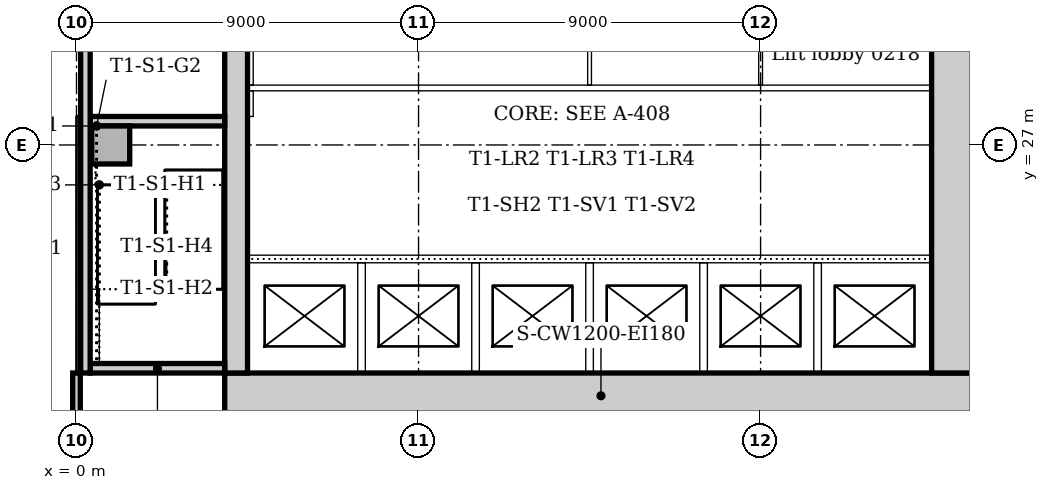
"""IFC4 building model, lengths in metres.
Left out: names, types, materials, properties, quantities, classifications, styles, units other than length and angle.
Written with IfcOpenShell. Run it as: python <this file> out.ifc"""

import sys

from ifc_helpers import new_model, si_unit, direction, frame, frame_2d, origin, origin_2d, place, context, subcontext, project, spatial, rectangle, extrude, element, fill, save


model = new_model("IFC4")
c1 = context("Model", 3, precision=1e-05, world=origin(), true_north=direction((0.0, 1.0)))
c2 = subcontext(c1, "Body", "Model", "MODEL_VIEW")
j1 = project(units=[si_unit("LENGTHUNIT", "METRE"), si_unit("PLANEANGLEUNIT", "RADIAN")], contexts=[c1])
p1 = place(None, origin())
s1 = spatial("IfcSite", under=j1, at=p1, CompositionType="ELEMENT")
p2 = place(p1, origin())
s2 = spatial("IfcBuilding", under=s1, at=p2, CompositionType="ELEMENT")
p3 = place(p2, frame((0.0, 0.0, 11.0)))
s3 = spatial("IfcBuildingStorey", under=s2, at=p3, CompositionType="ELEMENT", Elevation=11.0)
p4 = place(p3, frame((3.9, 20.4, 0.0), z_axis=(0.0, 0.0, 1.0), x_axis=(1.0, 0.0, 0.0)))
e1 = element("IfcWall", 1, at=p4, inside=s3, PredefinedType="SOLIDWALL", context=c2, shape_type="SweptSolid", body=[
    extrude(rectangle(XDim=19.8, YDim=1.2, at=frame_2d((9.9, 0.0))), origin(), (0.0, 0.0, 1.0), 5.0),
])
p5 = place(p3, frame((23.1, 21.0, 0.0), z_axis=(0.0, 0.0, 1.0), x_axis=(0.0, 1.0, 0.0)))
e2 = element("IfcWall", 2, at=p5, inside=s3, PredefinedType="SOLIDWALL", context=c2, shape_type="SweptSolid", body=[
    extrude(rectangle(XDim=10.5, YDim=1.2, at=frame_2d((5.25, 0.0))), origin(), (0.0, 0.0, 1.0), 5.0),
])
p6 = place(p5, frame((4.35, 0.0, 0.0)))
e3 = element("IfcOpeningElement", 3, at=p6, cuts=e2, PredefinedType="OPENING", context=c2, shape_type="SweptSolid", body=[
    extrude(rectangle(XDim=1.8, YDim=2.1, at=frame_2d((0.9, 1.05))), frame((0.0, 0.61, 0.0), z_axis=(0.0, -1.0, 0.0), x_axis=(1.0, 0.0, 0.0)), (0.0, 0.0, 1.0), 1.22),
])
p7 = place(p3, frame((4.2, 31.5, 0.0), z_axis=(0.0, 0.0, 1.0), x_axis=(0.0, -1.0, 0.0)))
e4 = element("IfcWall", 4, at=p7, inside=s3, PredefinedType="SOLIDWALL", context=c2, shape_type="SweptSolid", body=[
    extrude(rectangle(XDim=10.5, YDim=0.6, at=frame_2d((5.25, 0.0))), origin(), (0.0, 0.0, 1.0), 5.0),
])
p8 = place(p7, frame((4.25, 0.0, 0.0)))
e5 = element("IfcOpeningElement", 5, at=p8, cuts=e4, PredefinedType="OPENING", context=c2, shape_type="SweptSolid", body=[
    extrude(rectangle(XDim=1.0, YDim=2.1, at=frame_2d((0.5, 1.05))), frame((0.0, 0.31, 0.0), z_axis=(0.0, -1.0, 0.0), x_axis=(1.0, 0.0, 0.0)), (0.0, 0.0, 1.0), 0.62),
])
p9 = place(p3, frame((0.36, 21.125, 0.0), z_axis=(0.0, 0.0, 1.0), x_axis=(1.0, 0.0, 0.0)))
e6 = element("IfcWall", 6, at=p9, inside=s3, PredefinedType="SOLIDWALL", context=c2, shape_type="SweptSolid", body=[
    extrude(rectangle(XDim=3.54, YDim=0.25, at=frame_2d((1.77, 0.0))), origin(), (0.0, 0.0, 1.0), 5.0),
])
p10 = place(p3, frame((3.9, 27.625, 0.0), z_axis=(0.0, 0.0, 1.0), x_axis=(-1.0, 0.0, 0.0)))
e7 = element("IfcWall", 7, at=p10, inside=s3, PredefinedType="SOLIDWALL", context=c2, shape_type="SweptSolid", body=[
    extrude(rectangle(XDim=3.54, YDim=0.25, at=frame_2d((1.77, 0.0))), origin(), (0.0, 0.0, 1.0), 5.0),
])
p11 = place(p10, frame((0.4, 0.0, 0.0)))
e8 = element("IfcOpeningElement", 8, at=p11, cuts=e7, PredefinedType="OPENING", context=c2, shape_type="SweptSolid", body=[
    extrude(rectangle(XDim=1.0, YDim=2.1, at=frame_2d((0.5, 1.05))), frame((0.0, 0.135, 0.0), z_axis=(0.0, -1.0, 0.0), x_axis=(1.0, 0.0, 0.0)), (0.0, 0.0, 1.0), 0.27),
])
p12 = place(p3, frame((0.235, 21.0, 0.0), z_axis=(0.0, 0.0, 1.0), x_axis=(0.0, 1.0, 0.0)))
e9 = element("IfcWall", 9, at=p12, inside=s3, PredefinedType="SOLIDWALL", context=c2, shape_type="SweptSolid", body=[
    extrude(rectangle(XDim=21.0, YDim=0.25, at=frame_2d((10.5, 0.0))), origin(), (0.0, 0.0, 1.0), 5.0),
])
p13 = place(p3, frame((0.9, 27.0, 0.0), z_axis=(0.0, 0.0, 1.0), x_axis=(1.0, 0.0, 0.0)))
e10 = element("IfcColumn", 10, at=p13, inside=s3, PredefinedType="COLUMN", context=c2, shape_type="SweptSolid", body=[
    extrude(rectangle(XDim=1.0, YDim=1.0, at=origin_2d()), origin(), (0.0, 0.0, 1.0), 5.0),
])
p14 = place(p3, frame((0.0, 3.7, 0.0), z_axis=(0.0, 0.0, 1.0), x_axis=(0.0, 1.0, 0.0)))
e11 = element("IfcWall", 11, at=p14, inside=s3, PredefinedType="PARTITIONING", context=c2, shape_type="SweptSolid", body=[
    extrude(rectangle(XDim=17.3, YDim=0.2, at=frame_2d((8.65, 0.0))), origin(), (0.0, 0.0, 1.0), 4.7),
])
p15 = place(p14, frame((7.7, 0.0, 0.0)))
e12 = element("IfcOpeningElement", 12, at=p15, cuts=e11, PredefinedType="OPENING", context=c2, shape_type="SweptSolid", body=[
    extrude(rectangle(XDim=1.8, YDim=2.1, at=frame_2d((0.9, 1.05))), frame((0.0, 0.11, 0.0), z_axis=(0.0, -1.0, 0.0), x_axis=(1.0, 0.0, 0.0)), (0.0, 0.0, 1.0), 0.22),
])
p16 = place(p3, frame((0.48, 21.25, 0.0), z_axis=(0.0, 0.0, 1.0), x_axis=(0.0, 1.0, 0.0)))
e13 = element("IfcWall", 13, at=p16, inside=s3, PredefinedType="STANDARD", context=c2, shape_type="SweptSolid", body=[
    extrude(rectangle(XDim=1.955, YDim=0.24, at=frame_2d((0.978, 0.0))), origin(), (0.0, 0.0, 1.0), 5.0),
])
p17 = place(p3, frame((4.5, 24.0, 0.0), z_axis=(0.0, 0.0, 1.0), x_axis=(1.0, 0.0, 0.0)))
e14 = element("IfcWall", 14, at=p17, inside=s3, PredefinedType="PARTITIONING", context=c2, shape_type="SweptSolid", body=[
    extrude(rectangle(XDim=18.0, YDim=0.2, at=frame_2d((9.0, 0.0))), origin(), (0.0, 0.0, 1.0), 4.7),
])
p18 = place(p17, frame((0.95, 0.0, 0.0)))
e15 = element("IfcOpeningElement", 15, at=p18, cuts=e14, PredefinedType="OPENING", context=c2, shape_type="SweptSolid", body=[
    extrude(rectangle(XDim=1.1, YDim=2.1, at=frame_2d((0.55, 1.05))), frame((0.0, 0.11, 0.0), z_axis=(0.0, -1.0, 0.0), x_axis=(1.0, 0.0, 0.0)), (0.0, 0.0, 1.0), 0.22),
])
p19 = place(p17, frame((3.95, 0.0, 0.0)))
e16 = element("IfcOpeningElement", 16, at=p19, cuts=e14, PredefinedType="OPENING", context=c2, shape_type="SweptSolid", body=[
    extrude(rectangle(XDim=1.1, YDim=2.1, at=frame_2d((0.55, 1.05))), frame((0.0, 0.11, 0.0), z_axis=(0.0, -1.0, 0.0), x_axis=(1.0, 0.0, 0.0)), (0.0, 0.0, 1.0), 0.22),
])
p20 = place(p17, frame((6.95, 0.0, 0.0)))
e17 = element("IfcOpeningElement", 17, at=p20, cuts=e14, PredefinedType="OPENING", context=c2, shape_type="SweptSolid", body=[
    extrude(rectangle(XDim=1.1, YDim=2.1, at=frame_2d((0.55, 1.05))), frame((0.0, 0.11, 0.0), z_axis=(0.0, -1.0, 0.0), x_axis=(1.0, 0.0, 0.0)), (0.0, 0.0, 1.0), 0.22),
])
p21 = place(p17, frame((9.95, 0.0, 0.0)))
e18 = element("IfcOpeningElement", 18, at=p21, cuts=e14, PredefinedType="OPENING", context=c2, shape_type="SweptSolid", body=[
    extrude(rectangle(XDim=1.1, YDim=2.1, at=frame_2d((0.55, 1.05))), frame((0.0, 0.11, 0.0), z_axis=(0.0, -1.0, 0.0), x_axis=(1.0, 0.0, 0.0)), (0.0, 0.0, 1.0), 0.22),
])
p22 = place(p17, frame((12.95, 0.0, 0.0)))
e19 = element("IfcOpeningElement", 19, at=p22, cuts=e14, PredefinedType="OPENING", context=c2, shape_type="SweptSolid", body=[
    extrude(rectangle(XDim=1.1, YDim=2.1, at=frame_2d((0.55, 1.05))), frame((0.0, 0.11, 0.0), z_axis=(0.0, -1.0, 0.0), x_axis=(1.0, 0.0, 0.0)), (0.0, 0.0, 1.0), 0.22),
])
p23 = place(p17, frame((15.95, 0.0, 0.0)))
e20 = element("IfcOpeningElement", 20, at=p23, cuts=e14, PredefinedType="OPENING", context=c2, shape_type="SweptSolid", body=[
    extrude(rectangle(XDim=1.1, YDim=2.1, at=frame_2d((0.55, 1.05))), frame((0.0, 0.11, 0.0), z_axis=(0.0, -1.0, 0.0), x_axis=(1.0, 0.0, 0.0)), (0.0, 0.0, 1.0), 0.22),
])
for number, where, z_axis, x_axis in (
    (21, (7.5, 21.0, 0.0), (0.0, 0.0, 1.0), (0.0, 1.0, 0.0)),
    (22, (10.5, 21.0, 0.0), (0.0, 0.0, 1.0), (0.0, 1.0, 0.0)),
    (23, (13.5, 21.0, 0.0), (0.0, 0.0, 1.0), (0.0, 1.0, 0.0)),
    (24, (16.5, 21.0, 0.0), (0.0, 0.0, 1.0), (0.0, 1.0, 0.0)),
    (25, (19.5, 21.0, 0.0), (0.0, 0.0, 1.0), (0.0, 1.0, 0.0)),
):
    element("IfcWall", number, at=place(p3, frame(where, z_axis=z_axis, x_axis=x_axis)), inside=s3, PredefinedType="PARTITIONING", context=c2, shape_type="SweptSolid", body=[
        extrude(rectangle(XDim=2.9, YDim=0.2, at=frame_2d((1.45, 0.0))), origin(), (0.0, 0.0, 1.0), 4.7),
    ])
p24 = place(p3, frame((4.5, 28.5, 0.0), z_axis=(0.0, 0.0, 1.0), x_axis=(1.0, 0.0, 0.0)))
e26 = element("IfcWall", 26, at=p24, inside=s3, PredefinedType="PARTITIONING", context=c2, shape_type="SweptSolid", body=[
    extrude(rectangle(XDim=18.0, YDim=0.15, at=frame_2d((9.0, 0.0))), origin(), (0.0, 0.0, 1.0), 4.7),
])
p25 = place(p24, frame((4.1, 0.0, 0.0)))
e27 = element("IfcOpeningElement", 27, at=p25, cuts=e26, PredefinedType="OPENING", context=c2, shape_type="SweptSolid", body=[
    extrude(rectangle(XDim=0.9, YDim=2.1, at=frame_2d((0.45, 1.05))), frame((0.0, 0.085, 0.0), z_axis=(0.0, -1.0, 0.0), x_axis=(1.0, 0.0, 0.0)), (0.0, 0.0, 1.0), 0.17),
])
p26 = place(p24, frame((10.8, 0.0, 0.0)))
e28 = element("IfcOpeningElement", 28, at=p26, cuts=e26, PredefinedType="OPENING", context=c2, shape_type="SweptSolid", body=[
    extrude(rectangle(XDim=0.9, YDim=2.1, at=frame_2d((0.45, 1.05))), frame((0.0, 0.085, 0.0), z_axis=(0.0, -1.0, 0.0), x_axis=(1.0, 0.0, 0.0)), (0.0, 0.0, 1.0), 0.17),
])
p27 = place(p24, frame((15.2, 0.0, 0.0)))
e29 = element("IfcOpeningElement", 29, at=p27, cuts=e26, PredefinedType="OPENING", context=c2, shape_type="SweptSolid", body=[
    extrude(rectangle(XDim=0.9, YDim=2.1, at=frame_2d((0.45, 1.05))), frame((0.0, 0.085, 0.0), z_axis=(0.0, -1.0, 0.0), x_axis=(1.0, 0.0, 0.0)), (0.0, 0.0, 1.0), 0.17),
])
p28 = place(p3, frame((4.575, 27.75, 0.0), z_axis=(0.0, 0.0, 1.0), x_axis=(0.0, 1.0, 0.0)))
e30 = element("IfcWall", 30, at=p28, inside=s3, PredefinedType="PARTITIONING", context=c2, shape_type="SweptSolid", body=[
    extrude(rectangle(XDim=0.675, YDim=0.15, at=frame_2d((0.338, 0.0))), origin(), (0.0, 0.0, 1.0), 4.7),
])
p29 = place(p3, frame((4.575, 28.575, 0.0), z_axis=(0.0, 0.0, 1.0), x_axis=(0.0, 1.0, 0.0)))
e31 = element("IfcWall", 31, at=p29, inside=s3, PredefinedType="PARTITIONING", context=c2, shape_type="SweptSolid", body=[
    extrude(rectangle(XDim=2.675, YDim=0.15, at=frame_2d((1.337, 0.0))), origin(), (0.0, 0.0, 1.0), 4.7),
])
for number, where, z_axis, x_axis in (
    (32, (13.5, 28.575, 0.0), (0.0, 0.0, 1.0), (0.0, 1.0, 0.0)),
    (33, (18.0, 28.575, 0.0), (0.0, 0.0, 1.0), (0.0, 1.0, 0.0)),
):
    element("IfcWall", number, at=place(p3, frame(where, z_axis=z_axis, x_axis=x_axis)), inside=s3, PredefinedType="PARTITIONING", context=c2, shape_type="SweptSolid", body=[
        extrude(rectangle(XDim=2.675, YDim=0.1, at=frame_2d((1.337, 0.0))), origin(), (0.0, 0.0, 1.0), 4.7),
    ])
p30 = place(p8, frame((1.0, 0.0, 0.0), z_axis=(0.0, 0.0, 1.0), x_axis=(-1.0, 0.0, 0.0)))
e34 = element("IfcDoor", 34, at=p30, inside=s3, OperationType="SINGLE_SWING_RIGHT", PredefinedType="DOOR", context=c2, shape_type="SweptSolid", body=[
    extrude(rectangle(XDim=1.0, YDim=2.1, at=frame_2d((0.5, 1.05))), frame((0.0, 0.025, 0.0), z_axis=(0.0, -1.0, 0.0), x_axis=(1.0, 0.0, 0.0)), (0.0, 0.0, 1.0), 0.05),
])
fill(e5, e34)
p31 = place(p11, origin())
e35 = element("IfcDoor", 35, at=p31, inside=s3, OperationType="SINGLE_SWING_LEFT", PredefinedType="DOOR", context=c2, shape_type="SweptSolid", body=[
    extrude(rectangle(XDim=1.0, YDim=2.1, at=frame_2d((0.5, 1.05))), frame((0.0, 0.025, 0.0), z_axis=(0.0, -1.0, 0.0), x_axis=(1.0, 0.0, 0.0)), (0.0, 0.0, 1.0), 0.05),
])
fill(e8, e35)
p32 = place(p18, origin())
e36 = element("IfcDoor", 36, at=p32, inside=s3, OperationType="SLIDING_TO_LEFT", PredefinedType="DOOR", context=c2, shape_type="SweptSolid", body=[
    extrude(rectangle(XDim=1.1, YDim=2.1, at=frame_2d((0.55, 1.05))), frame((0.0, 0.025, 0.0), z_axis=(0.0, -1.0, 0.0), x_axis=(1.0, 0.0, 0.0)), (0.0, 0.0, 1.0), 0.05),
])
fill(e15, e36)
p33 = place(p19, origin())
e37 = element("IfcDoor", 37, at=p33, inside=s3, OperationType="SLIDING_TO_LEFT", PredefinedType="DOOR", context=c2, shape_type="SweptSolid", body=[
    extrude(rectangle(XDim=1.1, YDim=2.1, at=frame_2d((0.55, 1.05))), frame((0.0, 0.025, 0.0), z_axis=(0.0, -1.0, 0.0), x_axis=(1.0, 0.0, 0.0)), (0.0, 0.0, 1.0), 0.05),
])
fill(e16, e37)
p34 = place(p20, origin())
e38 = element("IfcDoor", 38, at=p34, inside=s3, OperationType="SLIDING_TO_LEFT", PredefinedType="DOOR", context=c2, shape_type="SweptSolid", body=[
    extrude(rectangle(XDim=1.1, YDim=2.1, at=frame_2d((0.55, 1.05))), frame((0.0, 0.025, 0.0), z_axis=(0.0, -1.0, 0.0), x_axis=(1.0, 0.0, 0.0)), (0.0, 0.0, 1.0), 0.05),
])
fill(e17, e38)
p35 = place(p21, origin())
e39 = element("IfcDoor", 39, at=p35, inside=s3, OperationType="SLIDING_TO_LEFT", PredefinedType="DOOR", context=c2, shape_type="SweptSolid", body=[
    extrude(rectangle(XDim=1.1, YDim=2.1, at=frame_2d((0.55, 1.05))), frame((0.0, 0.025, 0.0), z_axis=(0.0, -1.0, 0.0), x_axis=(1.0, 0.0, 0.0)), (0.0, 0.0, 1.0), 0.05),
])
fill(e18, e39)
p36 = place(p22, origin())
e40 = element("IfcDoor", 40, at=p36, inside=s3, OperationType="SLIDING_TO_LEFT", PredefinedType="DOOR", context=c2, shape_type="SweptSolid", body=[
    extrude(rectangle(XDim=1.1, YDim=2.1, at=frame_2d((0.55, 1.05))), frame((0.0, 0.025, 0.0), z_axis=(0.0, -1.0, 0.0), x_axis=(1.0, 0.0, 0.0)), (0.0, 0.0, 1.0), 0.05),
])
fill(e19, e40)
p37 = place(p23, origin())
e41 = element("IfcDoor", 41, at=p37, inside=s3, OperationType="SLIDING_TO_LEFT", PredefinedType="DOOR", context=c2, shape_type="SweptSolid", body=[
    extrude(rectangle(XDim=1.1, YDim=2.1, at=frame_2d((0.55, 1.05))), frame((0.0, 0.025, 0.0), z_axis=(0.0, -1.0, 0.0), x_axis=(1.0, 0.0, 0.0)), (0.0, 0.0, 1.0), 0.05),
])
fill(e20, e41)
p38 = place(p6, origin())
e42 = element("IfcDoor", 42, at=p38, inside=s3, OperationType="DOUBLE_DOOR_DOUBLE_SWING", PredefinedType="DOOR", context=c2, shape_type="SweptSolid", body=[
    extrude(rectangle(XDim=1.8, YDim=2.1, at=frame_2d((0.9, 1.05))), frame((0.0, 0.025, 0.0), z_axis=(0.0, -1.0, 0.0), x_axis=(1.0, 0.0, 0.0)), (0.0, 0.0, 1.0), 0.05),
])
fill(e3, e42)
p39 = place(p25, origin())
e43 = element("IfcDoor", 43, at=p39, inside=s3, OperationType="SINGLE_SWING_RIGHT", PredefinedType="DOOR", context=c2, shape_type="SweptSolid", body=[
    extrude(rectangle(XDim=0.9, YDim=2.1, at=frame_2d((0.45, 1.05))), frame((0.0, 0.025, 0.0), z_axis=(0.0, -1.0, 0.0), x_axis=(1.0, 0.0, 0.0)), (0.0, 0.0, 1.0), 0.05),
])
fill(e27, e43)
p40 = place(p26, origin())
e44 = element("IfcDoor", 44, at=p40, inside=s3, OperationType="SINGLE_SWING_RIGHT", PredefinedType="DOOR", context=c2, shape_type="SweptSolid", body=[
    extrude(rectangle(XDim=0.9, YDim=2.1, at=frame_2d((0.45, 1.05))), frame((0.0, 0.025, 0.0), z_axis=(0.0, -1.0, 0.0), x_axis=(1.0, 0.0, 0.0)), (0.0, 0.0, 1.0), 0.05),
])
fill(e28, e44)
p41 = place(p27, origin())
e45 = element("IfcDoor", 45, at=p41, inside=s3, OperationType="SINGLE_SWING_LEFT", PredefinedType="DOOR", context=c2, shape_type="SweptSolid", body=[
    extrude(rectangle(XDim=0.9, YDim=2.1, at=frame_2d((0.45, 1.05))), frame((0.0, 0.025, 0.0), z_axis=(0.0, -1.0, 0.0), x_axis=(1.0, 0.0, 0.0)), (0.0, 0.0, 1.0), 0.05),
])
fill(e29, e45)
save(model, sys.argv[1])
